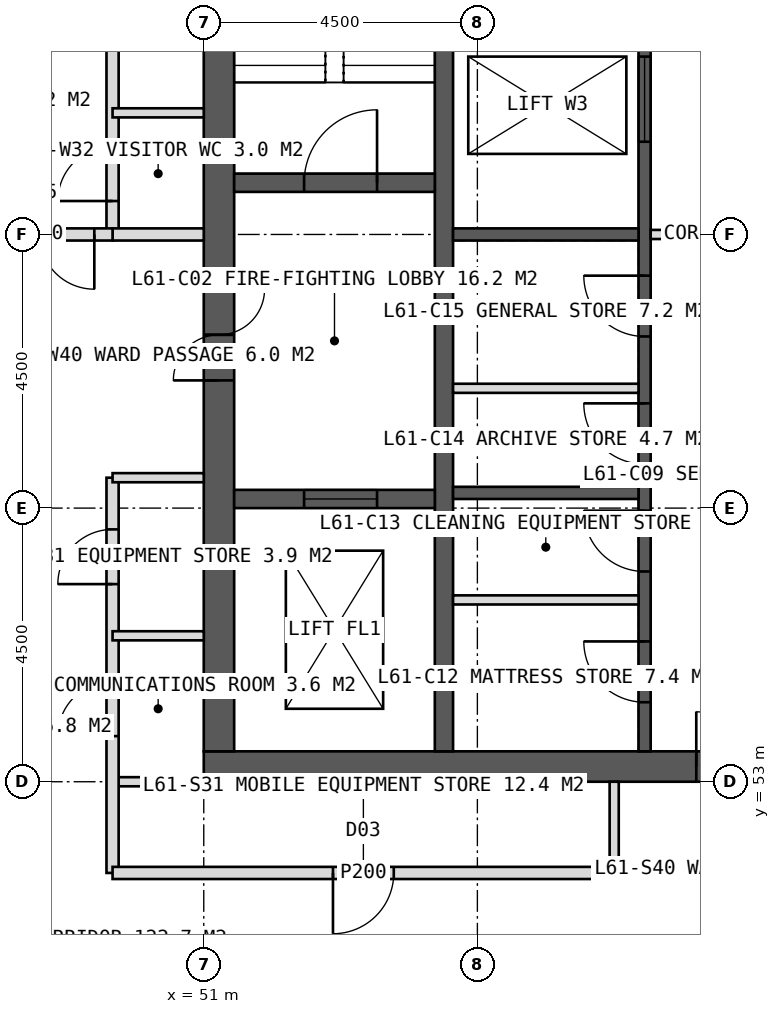
"""IFC4 building model, lengths in metres.
Left out: names, types, materials, properties, quantities, classifications, styles, units other than length and angle.
Written with IfcOpenShell. Run it as: python <this file> out.ifc"""

import sys

from ifc_helpers import new_model, si_unit, direction, frame, frame_2d, origin, place, context, subcontext, project, spatial, rectangle, extrude, element, fill, save


model = new_model("IFC4")
c1 = context("Model", 3, precision=1e-05, world=origin(), true_north=direction((0.0, 1.0)))
c2 = subcontext(c1, "Body", "Model", "MODEL_VIEW")
j1 = project(units=[si_unit("LENGTHUNIT", "METRE"), si_unit("PLANEANGLEUNIT", "RADIAN")], contexts=[c1])
p1 = place(None, origin())
s1 = spatial("IfcSite", under=j1, at=p1, CompositionType="ELEMENT")
p2 = place(p1, origin())
s2 = spatial("IfcBuilding", under=s1, at=p2, CompositionType="ELEMENT")
p3 = place(p2, frame((0.0, 0.0, 254.0)))
s3 = spatial("IfcBuildingStorey", under=s2, at=p3, CompositionType="ELEMENT", Elevation=254.0)
p4 = place(p3, frame((51.0, 53.25, 0.0), z_axis=(0.0, 0.0, 1.0), x_axis=(1.0, 0.0, 0.0)))
e1 = element("IfcWall", 1, at=p4, inside=s3, PredefinedType="SHEAR", context=c2, shape_type="SweptSolid", body=[
    extrude(rectangle(XDim=18.0, YDim=0.5, at=frame_2d((9.0, 0.0))), origin(), (0.0, 0.0, 1.0), 4.0),
])
p5 = place(p4, frame((8.1, 0.0, 0.0)))
e2 = element("IfcOpeningElement", 2, at=p5, cuts=e1, PredefinedType="OPENING", context=c2, shape_type="SweptSolid", body=[
    extrude(rectangle(XDim=1.8, YDim=2.2, at=frame_2d((0.9, 1.1))), frame((0.0, 0.26, 0.0), z_axis=(0.0, -1.0, 0.0), x_axis=(1.0, 0.0, 0.0)), (0.0, 0.0, 1.0), 0.52),
])
p6 = place(p3, frame((51.25, 53.5, 0.0), z_axis=(0.0, 0.0, 1.0), x_axis=(0.0, 1.0, 0.0)))
e3 = element("IfcWall", 3, at=p6, inside=s3, PredefinedType="SHEAR", context=c2, shape_type="SweptSolid", body=[
    extrude(rectangle(XDim=17.0, YDim=0.5, at=frame_2d((8.5, 0.0))), origin(), (0.0, 0.0, 1.0), 4.0),
])
p7 = place(p6, frame((6.1, 0.0, 0.0)))
e4 = element("IfcOpeningElement", 4, at=p7, cuts=e3, PredefinedType="OPENING", context=c2, shape_type="SweptSolid", body=[
    extrude(rectangle(XDim=1.5, YDim=2.2, at=frame_2d((0.75, 1.1))), frame((0.0, 0.26, 0.0), z_axis=(0.0, -1.0, 0.0), x_axis=(1.0, 0.0, 0.0)), (0.0, 0.0, 1.0), 0.52),
])
p8 = place(p3, frame((54.95, 53.5, 0.0), z_axis=(0.0, 0.0, 1.0), x_axis=(0.0, 1.0, 0.0)))
e5 = element("IfcWall", 5, at=p8, inside=s3, PredefinedType="SHEAR", context=c2, shape_type="SweptSolid", body=[
    extrude(rectangle(XDim=17.0, YDim=0.3, at=frame_2d((8.5, 0.0))), origin(), (0.0, 0.0, 1.0), 4.0),
])
p9 = place(p3, frame((58.25, 53.5, 0.0), z_axis=(0.0, 0.0, 1.0), x_axis=(0.0, 1.0, 0.0)))
e6 = element("IfcWall", 6, at=p9, inside=s3, PredefinedType="SHEAR", context=c2, shape_type="SweptSolid", body=[
    extrude(rectangle(XDim=17.0, YDim=0.2, at=frame_2d((8.5, 0.0))), origin(), (0.0, 0.0, 1.0), 4.0),
])
p10 = place(p9, frame((0.808, 0.0, 0.0)))
e7 = element("IfcOpeningElement", 7, at=p10, cuts=e6, PredefinedType="OPENING", context=c2, shape_type="SweptSolid", body=[
    extrude(rectangle(XDim=1.0, YDim=2.1, at=frame_2d((0.5, 1.05))), frame((0.0, 0.11, 0.0), z_axis=(0.0, -1.0, 0.0), x_axis=(1.0, 0.0, 0.0)), (0.0, 0.0, 1.0), 0.22),
])
p11 = place(p9, frame((2.958, 0.0, 0.0)))
e8 = element("IfcOpeningElement", 8, at=p11, cuts=e6, PredefinedType="OPENING", context=c2, shape_type="SweptSolid", body=[
    extrude(rectangle(XDim=1.0, YDim=2.1, at=frame_2d((0.5, 1.05))), frame((0.0, 0.11, 0.0), z_axis=(0.0, -1.0, 0.0), x_axis=(1.0, 0.0, 0.0)), (0.0, 0.0, 1.0), 0.22),
])
p12 = place(p9, frame((4.722, 0.0, 0.0)))
e9 = element("IfcOpeningElement", 9, at=p12, cuts=e6, PredefinedType="OPENING", context=c2, shape_type="SweptSolid", body=[
    extrude(rectangle(XDim=1.0, YDim=2.1, at=frame_2d((0.5, 1.05))), frame((0.0, 0.11, 0.0), z_axis=(0.0, -1.0, 0.0), x_axis=(1.0, 0.0, 0.0)), (0.0, 0.0, 1.0), 0.22),
])
p13 = place(p9, frame((6.823, 0.0, 0.0)))
e10 = element("IfcOpeningElement", 10, at=p13, cuts=e6, PredefinedType="OPENING", context=c2, shape_type="SweptSolid", body=[
    extrude(rectangle(XDim=1.0, YDim=2.1, at=frame_2d((0.5, 1.05))), frame((0.0, 0.11, 0.0), z_axis=(0.0, -1.0, 0.0), x_axis=(1.0, 0.0, 0.0)), (0.0, 0.0, 1.0), 0.22),
])
p14 = place(p9, frame((10.025, 0.0, 0.0)))
e11 = element("IfcOpeningElement", 11, at=p14, cuts=e6, PredefinedType="OPENING", context=c2, shape_type="SweptSolid", body=[
    extrude(rectangle(XDim=1.4, YDim=2.2, at=frame_2d((0.7, 1.1))), frame((0.0, 0.11, 0.0), z_axis=(0.0, -1.0, 0.0), x_axis=(1.0, 0.0, 0.0)), (0.0, 0.0, 1.0), 0.22),
])
p15 = place(p9, frame((14.325, 0.0, 0.0)))
e12 = element("IfcOpeningElement", 12, at=p15, cuts=e6, PredefinedType="OPENING", context=c2, shape_type="SweptSolid", body=[
    extrude(rectangle(XDim=1.4, YDim=2.2, at=frame_2d((0.7, 1.1))), frame((0.0, 0.11, 0.0), z_axis=(0.0, -1.0, 0.0), x_axis=(1.0, 0.0, 0.0)), (0.0, 0.0, 1.0), 0.22),
])
for number, where, z_axis, x_axis in (
    (13, (55.1, 57.75, 0.0), (0.0, 0.0, 1.0), (1.0, 0.0, 0.0)),
    (14, (55.1, 62.0, 0.0), (0.0, 0.0, 1.0), (1.0, 0.0, 0.0)),
):
    element("IfcWall", number, at=place(p3, frame(where, z_axis=z_axis, x_axis=x_axis)), inside=s3, PredefinedType="SHEAR", context=c2, shape_type="SweptSolid", body=[
        extrude(rectangle(XDim=3.05, YDim=0.2, at=frame_2d((1.525, 0.0))), origin(), (0.0, 0.0, 1.0), 4.0),
    ])
p16 = place(p3, frame((51.5, 62.85, 0.0), z_axis=(0.0, 0.0, 1.0), x_axis=(1.0, 0.0, 0.0)))
e15 = element("IfcWall", 15, at=p16, inside=s3, PredefinedType="SHEAR", context=c2, shape_type="SweptSolid", body=[
    extrude(rectangle(XDim=3.3, YDim=0.3, at=frame_2d((1.65, 0.0))), origin(), (0.0, 0.0, 1.0), 4.0),
])
p17 = place(p16, frame((1.15, 0.0, 0.0)))
e16 = element("IfcOpeningElement", 16, at=p17, cuts=e15, PredefinedType="OPENING", context=c2, shape_type="SweptSolid", body=[
    extrude(rectangle(XDim=1.2, YDim=2.1, at=frame_2d((0.6, 1.05))), frame((0.0, 0.16, 0.0), z_axis=(0.0, -1.0, 0.0), x_axis=(1.0, 0.0, 0.0)), (0.0, 0.0, 1.0), 0.32),
])
p18 = place(p3, frame((51.5, 57.65, 0.0), z_axis=(0.0, 0.0, 1.0), x_axis=(1.0, 0.0, 0.0)))
e17 = element("IfcWall", 17, at=p18, inside=s3, PredefinedType="SHEAR", context=c2, shape_type="SweptSolid", body=[
    extrude(rectangle(XDim=3.3, YDim=0.3, at=frame_2d((1.65, 0.0))), origin(), (0.0, 0.0, 1.0), 4.0),
])
p19 = place(p18, frame((1.15, 0.0, 0.0)))
e18 = element("IfcOpeningElement", 18, at=p19, cuts=e17, PredefinedType="OPENING", context=c2, shape_type="SweptSolid", body=[
    extrude(rectangle(XDim=1.2, YDim=2.2, at=frame_2d((0.6, 1.1))), frame((0.0, 0.16, 0.0), z_axis=(0.0, -1.0, 0.0), x_axis=(1.0, 0.0, 0.0)), (0.0, 0.0, 1.0), 0.32),
])
p20 = place(p3, frame((51.0, 53.0, 0.0), z_axis=(0.0, 0.0, 1.0), x_axis=(-1.0, 0.0, 0.0)))
e19 = element("IfcWall", 19, at=p20, inside=s3, PredefinedType="PARTITIONING", context=c2, shape_type="SweptSolid", body=[
    extrude(rectangle(XDim=1.5, YDim=0.15, at=frame_2d((0.75, 0.0))), origin(), (0.0, 0.0, 1.0), 3.75),
])
p21 = place(p3, frame((49.5, 51.5, 0.0), z_axis=(0.0, 0.0, 1.0), x_axis=(0.0, 1.0, 0.0)))
e20 = element("IfcWall", 20, at=p21, inside=s3, PredefinedType="PARTITIONING", context=c2, shape_type="SweptSolid", body=[
    extrude(rectangle(XDim=6.5, YDim=0.2, at=frame_2d((3.25, 0.0))), origin(), (0.0, 0.0, 1.0), 3.75),
])
p22 = place(p21, frame((2.25, 0.0, 0.0)))
e21 = element("IfcOpeningElement", 21, at=p22, cuts=e20, PredefinedType="OPENING", context=c2, shape_type="SweptSolid", body=[
    extrude(rectangle(XDim=0.9, YDim=2.1, at=frame_2d((0.45, 1.05))), frame((0.0, 0.11, 0.0), z_axis=(0.0, -1.0, 0.0), x_axis=(1.0, 0.0, 0.0)), (0.0, 0.0, 1.0), 0.22),
])
p23 = place(p21, frame((4.75, 0.0, 0.0)))
e22 = element("IfcOpeningElement", 22, at=p23, cuts=e20, PredefinedType="OPENING", context=c2, shape_type="SweptSolid", body=[
    extrude(rectangle(XDim=0.9, YDim=2.1, at=frame_2d((0.45, 1.05))), frame((0.0, 0.11, 0.0), z_axis=(0.0, -1.0, 0.0), x_axis=(1.0, 0.0, 0.0)), (0.0, 0.0, 1.0), 0.22),
])
p24 = place(p3, frame((49.5, 62.0, 0.0), z_axis=(0.0, 0.0, 1.0), x_axis=(0.0, 1.0, 0.0)))
e23 = element("IfcWall", 23, at=p24, inside=s3, PredefinedType="PARTITIONING", context=c2, shape_type="SweptSolid", body=[
    extrude(rectangle(XDim=10.5, YDim=0.2, at=frame_2d((5.25, 0.0))), origin(), (0.0, 0.0, 1.0), 3.75),
])
p25 = place(p24, frame((0.55, 0.0, 0.0)))
e24 = element("IfcOpeningElement", 24, at=p25, cuts=e23, PredefinedType="OPENING", context=c2, shape_type="SweptSolid", body=[
    extrude(rectangle(XDim=0.9, YDim=2.1, at=frame_2d((0.45, 1.05))), frame((0.0, 0.11, 0.0), z_axis=(0.0, -1.0, 0.0), x_axis=(1.0, 0.0, 0.0)), (0.0, 0.0, 1.0), 0.22),
])
p26 = place(p24, frame((5.75, 0.0, 0.0)))
e25 = element("IfcOpeningElement", 25, at=p26, cuts=e23, PredefinedType="OPENING", context=c2, shape_type="SweptSolid", body=[
    extrude(rectangle(XDim=1.0, YDim=2.1, at=frame_2d((0.5, 1.05))), frame((0.0, 0.11, 0.0), z_axis=(0.0, -1.0, 0.0), x_axis=(1.0, 0.0, 0.0)), (0.0, 0.0, 1.0), 0.22),
])
p27 = place(p3, frame((51.0, 58.0, 0.0), z_axis=(0.0, 0.0, 1.0), x_axis=(-1.0, 0.0, 0.0)))
e26 = element("IfcWall", 26, at=p27, inside=s3, PredefinedType="PARTITIONING", context=c2, shape_type="SweptSolid", body=[
    extrude(rectangle(XDim=1.5, YDim=0.15, at=frame_2d((0.75, 0.0))), origin(), (0.0, 0.0, 1.0), 3.75),
])
p28 = place(p3, frame((51.0, 62.0, 0.0), z_axis=(0.0, 0.0, 1.0), x_axis=(-1.0, 0.0, 0.0)))
e27 = element("IfcWall", 27, at=p28, inside=s3, PredefinedType="SOLIDWALL", context=c2, shape_type="SweptSolid", body=[
    extrude(rectangle(XDim=1.5, YDim=0.2, at=frame_2d((0.75, 0.0))), origin(), (0.0, 0.0, 1.0), 2.75),
])
for number, where, z_axis, x_axis in (
    (28, (51.0, 55.4, 0.0), (0.0, 0.0, 1.0), (-1.0, 0.0, 0.0)),
    (29, (51.0, 64.0, 0.0), (0.0, 0.0, 1.0), (-1.0, 0.0, 0.0)),
):
    element("IfcWall", number, at=place(p3, frame(where, z_axis=z_axis, x_axis=x_axis)), inside=s3, PredefinedType="PARTITIONING", context=c2, shape_type="SweptSolid", body=[
        extrude(rectangle(XDim=1.5, YDim=0.15, at=frame_2d((0.75, 0.0))), origin(), (0.0, 0.0, 1.0), 3.75),
    ])
p29 = place(p3, frame((57.75, 51.5, 0.0), z_axis=(0.0, 0.0, 1.0), x_axis=(-1.0, 0.0, 0.0)))
e30 = element("IfcWall", 30, at=p29, inside=s3, PredefinedType="PARTITIONING", context=c2, shape_type="SweptSolid", body=[
    extrude(rectangle(XDim=8.25, YDim=0.2, at=frame_2d((4.125, 0.0))), origin(), (0.0, 0.0, 1.0), 3.75),
])
p30 = place(p29, frame((3.625, 0.0, 0.0)))
e31 = element("IfcOpeningElement", 31, at=p30, cuts=e30, PredefinedType="OPENING", context=c2, shape_type="SweptSolid", body=[
    extrude(rectangle(XDim=1.0, YDim=2.1, at=frame_2d((0.5, 1.05))), frame((0.0, 0.11, 0.0), z_axis=(0.0, -1.0, 0.0), x_axis=(1.0, 0.0, 0.0)), (0.0, 0.0, 1.0), 0.22),
])
p31 = place(p3, frame((57.75, 53.0, 0.0), z_axis=(0.0, 0.0, 1.0), x_axis=(0.0, -1.0, 0.0)))
e32 = element("IfcWall", 32, at=p31, inside=s3, PredefinedType="PARTITIONING", context=c2, shape_type="SweptSolid", body=[
    extrude(rectangle(XDim=1.5, YDim=0.15, at=frame_2d((0.75, 0.0))), origin(), (0.0, 0.0, 1.0), 3.75),
])
p32 = place(p3, frame((49.5, 62.0, 0.0), z_axis=(0.0, 0.0, 1.0), x_axis=(-1.0, 0.0, 0.0)))
e33 = element("IfcWall", 33, at=p32, inside=s3, PredefinedType="SOLIDWALL", context=c2, shape_type="SweptSolid", body=[
    extrude(rectangle(XDim=2.6, YDim=0.2, at=frame_2d((1.3, 0.0))), origin(), (0.0, 0.0, 1.0), 2.75),
])
p33 = place(p32, frame((0.3, 0.0, 0.0)))
e34 = element("IfcOpeningElement", 34, at=p33, cuts=e33, PredefinedType="OPENING", context=c2, shape_type="SweptSolid", body=[
    extrude(rectangle(XDim=1.8, YDim=2.2, at=frame_2d((0.9, 1.1))), frame((0.0, 0.11, 0.0), z_axis=(0.0, -1.0, 0.0), x_axis=(1.0, 0.0, 0.0)), (0.0, 0.0, 1.0), 0.22),
])
for number, where, z_axis, x_axis in (
    (35, (55.1, 55.99, 0.0), (0.0, 0.0, 1.0), (1.0, 0.0, 0.0)),
    (36, (55.1, 59.47, 0.0), (0.0, 0.0, 1.0), (1.0, 0.0, 0.0)),
):
    element("IfcWall", number, at=place(p3, frame(where, z_axis=z_axis, x_axis=x_axis)), inside=s3, PredefinedType="PARTITIONING", context=c2, shape_type="SweptSolid", body=[
        extrude(rectangle(XDim=3.05, YDim=0.15, at=frame_2d((1.525, 0.0))), origin(), (0.0, 0.0, 1.0), 3.75),
    ])
p34 = place(p3, frame((58.35, 62.0, 0.0), z_axis=(0.0, 0.0, 1.0), x_axis=(1.0, 0.0, 0.0)))
e37 = element("IfcWall", 37, at=p34, inside=s3, PredefinedType="PARTITIONING", context=c2, shape_type="SweptSolid", body=[
    extrude(rectangle(XDim=3.3, YDim=0.15, at=frame_2d((1.65, 0.0))), origin(), (0.0, 0.0, 1.0), 3.75),
])
p35 = place(p22, origin())
e38 = element("IfcDoor", 38, at=p35, inside=s3, OperationType="SINGLE_SWING_LEFT", PredefinedType="DOOR", context=c2, shape_type="SweptSolid", body=[
    extrude(rectangle(XDim=0.9, YDim=2.1, at=frame_2d((0.45, 1.05))), frame((0.0, 0.025, 0.0), z_axis=(0.0, -1.0, 0.0), x_axis=(1.0, 0.0, 0.0)), (0.0, 0.0, 1.0), 0.05),
])
fill(e21, e38)
p36 = place(p23, origin())
e39 = element("IfcDoor", 39, at=p36, inside=s3, OperationType="SINGLE_SWING_LEFT", PredefinedType="DOOR", context=c2, shape_type="SweptSolid", body=[
    extrude(rectangle(XDim=0.9, YDim=2.1, at=frame_2d((0.45, 1.05))), frame((0.0, 0.025, 0.0), z_axis=(0.0, -1.0, 0.0), x_axis=(1.0, 0.0, 0.0)), (0.0, 0.0, 1.0), 0.05),
])
fill(e22, e39)
p37 = place(p25, origin())
e40 = element("IfcDoor", 40, at=p37, inside=s3, OperationType="SINGLE_SWING_LEFT", PredefinedType="DOOR", context=c2, shape_type="SweptSolid", body=[
    extrude(rectangle(XDim=0.9, YDim=2.1, at=frame_2d((0.45, 1.05))), frame((0.0, 0.025, 0.0), z_axis=(0.0, -1.0, 0.0), x_axis=(1.0, 0.0, 0.0)), (0.0, 0.0, 1.0), 0.05),
])
fill(e24, e40)
p38 = place(p30, origin())
e41 = element("IfcDoor", 41, at=p38, inside=s3, OperationType="SINGLE_SWING_RIGHT", PredefinedType="DOOR", context=c2, shape_type="SweptSolid", body=[
    extrude(rectangle(XDim=1.0, YDim=2.1, at=frame_2d((0.5, 1.05))), frame((0.0, 0.025, 0.0), z_axis=(0.0, -1.0, 0.0), x_axis=(1.0, 0.0, 0.0)), (0.0, 0.0, 1.0), 0.05),
])
fill(e31, e41)
p39 = place(p33, origin())
e42 = element("IfcDoor", 42, at=p39, inside=s3, OperationType="DOUBLE_DOOR_DOUBLE_SWING", PredefinedType="DOOR", context=c2, shape_type="SweptSolid", body=[
    extrude(rectangle(XDim=1.8, YDim=2.2, at=frame_2d((0.9, 1.1))), frame((0.0, 0.025, 0.0), z_axis=(0.0, -1.0, 0.0), x_axis=(1.0, 0.0, 0.0)), (0.0, 0.0, 1.0), 0.05),
])
fill(e34, e42)
p40 = place(p7, origin())
e43 = element("IfcDoor", 43, at=p40, inside=s3, OperationType="DOUBLE_DOOR_SINGLE_SWING", PredefinedType="DOOR", context=c2, shape_type="SweptSolid", body=[
    extrude(rectangle(XDim=1.5, YDim=2.2, at=frame_2d((0.75, 1.1))), frame((0.0, 0.025, 0.0), z_axis=(0.0, -1.0, 0.0), x_axis=(1.0, 0.0, 0.0)), (0.0, 0.0, 1.0), 0.05),
])
fill(e4, e43)
p41 = place(p17, origin())
e44 = element("IfcDoor", 44, at=p41, inside=s3, OperationType="SINGLE_SWING_RIGHT", PredefinedType="DOOR", context=c2, shape_type="SweptSolid", body=[
    extrude(rectangle(XDim=1.2, YDim=2.1, at=frame_2d((0.6, 1.05))), frame((0.0, 0.025, 0.0), z_axis=(0.0, -1.0, 0.0), x_axis=(1.0, 0.0, 0.0)), (0.0, 0.0, 1.0), 0.05),
])
fill(e16, e44)
p42 = place(p19, origin())
e45 = element("IfcDoor", 45, at=p42, inside=s3, OperationType="SLIDING_TO_LEFT", PredefinedType="DOOR", context=c2, shape_type="SweptSolid", body=[
    extrude(rectangle(XDim=1.2, YDim=2.2, at=frame_2d((0.6, 1.1))), frame((0.0, 0.025, 0.0), z_axis=(0.0, -1.0, 0.0), x_axis=(1.0, 0.0, 0.0)), (0.0, 0.0, 1.0), 0.05),
])
fill(e18, e45)
p43 = place(p10, origin())
e46 = element("IfcDoor", 46, at=p43, inside=s3, OperationType="SINGLE_SWING_RIGHT", PredefinedType="DOOR", context=c2, shape_type="SweptSolid", body=[
    extrude(rectangle(XDim=1.0, YDim=2.1, at=frame_2d((0.5, 1.05))), frame((0.0, 0.025, 0.0), z_axis=(0.0, -1.0, 0.0), x_axis=(1.0, 0.0, 0.0)), (0.0, 0.0, 1.0), 0.05),
])
fill(e7, e46)
p44 = place(p11, origin())
e47 = element("IfcDoor", 47, at=p44, inside=s3, OperationType="SINGLE_SWING_RIGHT", PredefinedType="DOOR", context=c2, shape_type="SweptSolid", body=[
    extrude(rectangle(XDim=1.0, YDim=2.1, at=frame_2d((0.5, 1.05))), frame((0.0, 0.025, 0.0), z_axis=(0.0, -1.0, 0.0), x_axis=(1.0, 0.0, 0.0)), (0.0, 0.0, 1.0), 0.05),
])
fill(e8, e47)
p45 = place(p12, origin())
e48 = element("IfcDoor", 48, at=p45, inside=s3, OperationType="SINGLE_SWING_RIGHT", PredefinedType="DOOR", context=c2, shape_type="SweptSolid", body=[
    extrude(rectangle(XDim=1.0, YDim=2.1, at=frame_2d((0.5, 1.05))), frame((0.0, 0.025, 0.0), z_axis=(0.0, -1.0, 0.0), x_axis=(1.0, 0.0, 0.0)), (0.0, 0.0, 1.0), 0.05),
])
fill(e9, e48)
p46 = place(p13, origin())
e49 = element("IfcDoor", 49, at=p46, inside=s3, OperationType="SINGLE_SWING_RIGHT", PredefinedType="DOOR", context=c2, shape_type="SweptSolid", body=[
    extrude(rectangle(XDim=1.0, YDim=2.1, at=frame_2d((0.5, 1.05))), frame((0.0, 0.025, 0.0), z_axis=(0.0, -1.0, 0.0), x_axis=(1.0, 0.0, 0.0)), (0.0, 0.0, 1.0), 0.05),
])
fill(e10, e49)
p47 = place(p14, origin())
e50 = element("IfcDoor", 50, at=p47, inside=s3, OperationType="SLIDING_TO_LEFT", PredefinedType="DOOR", context=c2, shape_type="SweptSolid", body=[
    extrude(rectangle(XDim=1.4, YDim=2.2, at=frame_2d((0.7, 1.1))), frame((0.0, 0.025, 0.0), z_axis=(0.0, -1.0, 0.0), x_axis=(1.0, 0.0, 0.0)), (0.0, 0.0, 1.0), 0.05),
])
fill(e11, e50)
p48 = place(p5, origin())
e51 = element("IfcDoor", 51, at=p48, inside=s3, OperationType="DOUBLE_DOOR_SINGLE_SWING", PredefinedType="DOOR", context=c2, shape_type="SweptSolid", body=[
    extrude(rectangle(XDim=1.8, YDim=2.2, at=frame_2d((0.9, 1.1))), frame((0.0, 0.025, 0.0), z_axis=(0.0, -1.0, 0.0), x_axis=(1.0, 0.0, 0.0)), (0.0, 0.0, 1.0), 0.05),
])
fill(e2, e51)
save(model, sys.argv[1])
